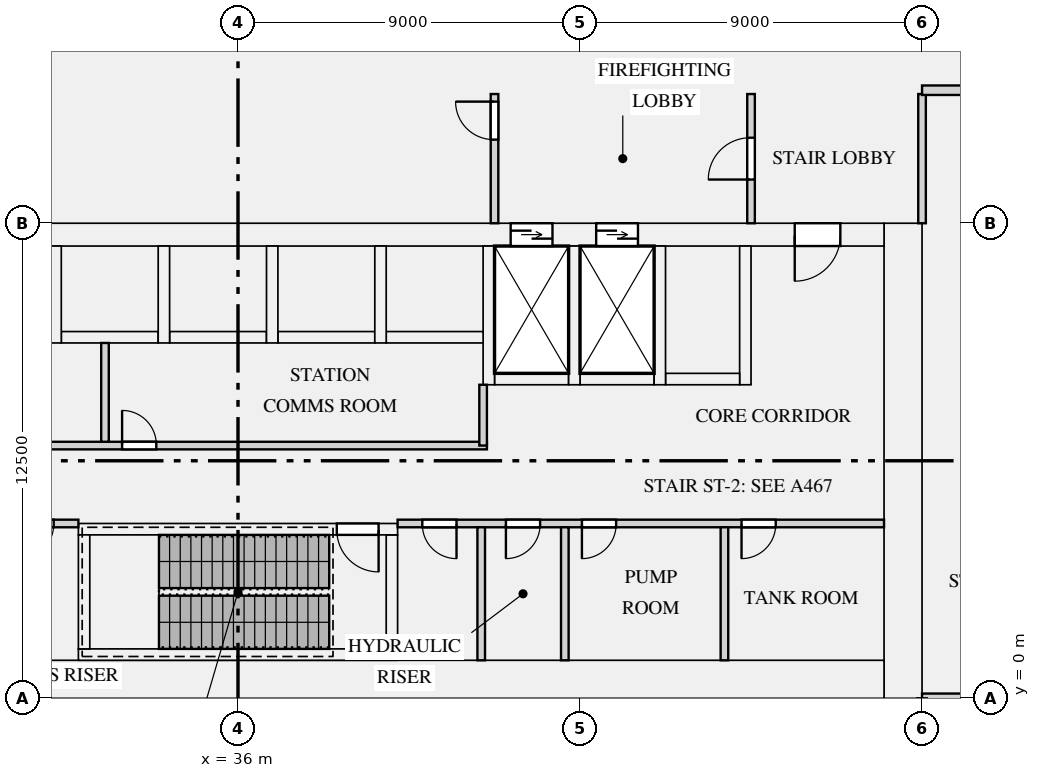
"""IFC4 building model, lengths in metres.
Left out: names, types, materials, properties, quantities, classifications, styles, units other than length and angle.
Written with IfcOpenShell. Run it as: python <this file> out.ifc"""

import sys

from ifc_helpers import new_model, si_unit, direction, frame, frame_2d, origin, place, context, subcontext, project, spatial, rectangle, extrude, element, fill, save


model = new_model("IFC4")
c1 = context("Model", 3, precision=1e-05, world=origin(), true_north=direction((0.0, 1.0)))
c2 = subcontext(c1, "Body", "Model", "MODEL_VIEW")
j1 = project(units=[si_unit("LENGTHUNIT", "METRE"), si_unit("PLANEANGLEUNIT", "RADIAN")], contexts=[c1])
p1 = place(None, origin())
s1 = spatial("IfcSite", under=j1, at=p1, CompositionType="ELEMENT")
p2 = place(p1, origin())
s2 = spatial("IfcBuilding", under=s1, at=p2, CompositionType="ELEMENT")
p3 = place(p2, frame((0.0, 0.0, -6.0)))
s3 = spatial("IfcBuildingStorey", under=s2, at=p3, CompositionType="ELEMENT", Elevation=-6.0)
p4 = place(p3, frame((53.5, 0.0, -0.5), z_axis=(0.0, 0.0, 1.0), x_axis=(0.0, 1.0, 0.0)))
e1 = element("IfcWall", 1, at=p4, inside=s3, PredefinedType="SHEAR", context=c2, shape_type="SweptSolid", body=[
    extrude(rectangle(XDim=12.5, YDim=1.0, at=frame_2d((6.25, 0.0))), origin(), (0.0, 0.0, 1.0), 6.5),
])
p5 = place(p3, frame((19.0, 0.5, -0.5), z_axis=(0.0, 0.0, 1.0), x_axis=(1.0, 0.0, 0.0)))
e2 = element("IfcWall", 2, at=p5, inside=s3, PredefinedType="SHEAR", context=c2, shape_type="SweptSolid", body=[
    extrude(rectangle(XDim=34.0, YDim=1.0, at=frame_2d((17.0, 0.0))), origin(), (0.0, 0.0, 1.0), 6.5),
])
p6 = place(p3, frame((19.0, 12.2, -0.5), z_axis=(0.0, 0.0, 1.0), x_axis=(1.0, 0.0, 0.0)))
e3 = element("IfcWall", 3, at=p6, inside=s3, PredefinedType="SHEAR", context=c2, shape_type="SweptSolid", body=[
    extrude(rectangle(XDim=34.0, YDim=0.6, at=frame_2d((17.0, 0.0))), origin(), (0.0, 0.0, 1.0), 6.5),
])
p7 = place(p6, frame((24.175, 0.0, 0.5)))
e4 = element("IfcOpeningElement", 4, at=p7, cuts=e3, PredefinedType="OPENING", context=c2, shape_type="SweptSolid", body=[
    extrude(rectangle(XDim=1.1, YDim=2.1, at=frame_2d((0.55, 1.05))), frame((0.0, 0.31, 0.0), z_axis=(0.0, -1.0, 0.0), x_axis=(1.0, 0.0, 0.0)), (0.0, 0.0, 1.0), 0.62),
])
p8 = place(p6, frame((26.425, 0.0, 0.5)))
e5 = element("IfcOpeningElement", 5, at=p8, cuts=e3, PredefinedType="OPENING", context=c2, shape_type="SweptSolid", body=[
    extrude(rectangle(XDim=1.1, YDim=2.1, at=frame_2d((0.55, 1.05))), frame((0.0, 0.31, 0.0), z_axis=(0.0, -1.0, 0.0), x_axis=(1.0, 0.0, 0.0)), (0.0, 0.0, 1.0), 0.62),
])
p9 = place(p6, frame((1.15, 0.0, 0.5)))
e6 = element("IfcOpeningElement", 6, at=p9, cuts=e3, PredefinedType="OPENING", context=c2, shape_type="SweptSolid", body=[
    extrude(rectangle(XDim=1.2, YDim=2.1, at=frame_2d((0.6, 1.05))), frame((0.0, 0.31, 0.0), z_axis=(0.0, -1.0, 0.0), x_axis=(1.0, 0.0, 0.0)), (0.0, 0.0, 1.0), 0.62),
])
p10 = place(p6, frame((31.65, 0.0, 0.5)))
e7 = element("IfcOpeningElement", 7, at=p10, cuts=e3, PredefinedType="OPENING", context=c2, shape_type="SweptSolid", body=[
    extrude(rectangle(XDim=1.2, YDim=2.1, at=frame_2d((0.6, 1.05))), frame((0.0, 0.31, 0.0), z_axis=(0.0, -1.0, 0.0), x_axis=(1.0, 0.0, 0.0)), (0.0, 0.0, 1.0), 0.62),
])
for number, where, z_axis, x_axis in (
    (8, (31.35, 9.5, -0.5), (0.0, 0.0, 1.0), (1.0, 0.0, 0.0)),
    (9, (31.2, 9.35, -0.5), (0.0, 0.0, 1.0), (0.0, 1.0, 0.0)),
):
    element("IfcWall", number, at=place(p3, frame(where, z_axis=z_axis, x_axis=x_axis)), inside=s3, PredefinedType="SHEAR", context=c2, shape_type="SweptSolid", body=[
        extrude(rectangle(XDim=2.55, YDim=0.3, at=frame_2d((1.275, 0.0))), origin(), (0.0, 0.0, 1.0), 6.5),
    ])
p11 = place(p3, frame((34.2, 9.5, -0.5), z_axis=(0.0, 0.0, 1.0), x_axis=(1.0, 0.0, 0.0)))
e10 = element("IfcWall", 10, at=p11, inside=s3, PredefinedType="SHEAR", context=c2, shape_type="SweptSolid", body=[
    extrude(rectangle(XDim=2.55, YDim=0.3, at=frame_2d((1.275, 0.0))), origin(), (0.0, 0.0, 1.0), 6.5),
])
p12 = place(p3, frame((34.05, 9.35, -0.5), z_axis=(0.0, 0.0, 1.0), x_axis=(0.0, 1.0, 0.0)))
e11 = element("IfcWall", 11, at=p12, inside=s3, PredefinedType="SHEAR", context=c2, shape_type="SweptSolid", body=[
    extrude(rectangle(XDim=2.55, YDim=0.3, at=frame_2d((1.275, 0.0))), origin(), (0.0, 0.0, 1.0), 6.5),
])
p13 = place(p3, frame((37.05, 9.5, -0.5), z_axis=(0.0, 0.0, 1.0), x_axis=(1.0, 0.0, 0.0)))
e12 = element("IfcWall", 12, at=p13, inside=s3, PredefinedType="SHEAR", context=c2, shape_type="SweptSolid", body=[
    extrude(rectangle(XDim=2.55, YDim=0.3, at=frame_2d((1.275, 0.0))), origin(), (0.0, 0.0, 1.0), 6.5),
])
p14 = place(p3, frame((36.9, 9.35, -0.5), z_axis=(0.0, 0.0, 1.0), x_axis=(0.0, 1.0, 0.0)))
e13 = element("IfcWall", 13, at=p14, inside=s3, PredefinedType="SHEAR", context=c2, shape_type="SweptSolid", body=[
    extrude(rectangle(XDim=2.55, YDim=0.3, at=frame_2d((1.275, 0.0))), origin(), (0.0, 0.0, 1.0), 6.5),
])
p15 = place(p3, frame((39.9, 9.5, -0.5), z_axis=(0.0, 0.0, 1.0), x_axis=(1.0, 0.0, 0.0)))
e14 = element("IfcWall", 14, at=p15, inside=s3, PredefinedType="SHEAR", context=c2, shape_type="SweptSolid", body=[
    extrude(rectangle(XDim=2.55, YDim=0.3, at=frame_2d((1.275, 0.0))), origin(), (0.0, 0.0, 1.0), 6.5),
])
p16 = place(p3, frame((39.75, 9.35, -0.5), z_axis=(0.0, 0.0, 1.0), x_axis=(0.0, 1.0, 0.0)))
e15 = element("IfcWall", 15, at=p16, inside=s3, PredefinedType="SHEAR", context=c2, shape_type="SweptSolid", body=[
    extrude(rectangle(XDim=2.55, YDim=0.3, at=frame_2d((1.275, 0.0))), origin(), (0.0, 0.0, 1.0), 6.5),
])
p17 = place(p3, frame((42.75, 8.4, -0.5), z_axis=(0.0, 0.0, 1.0), x_axis=(1.0, 0.0, 0.0)))
e16 = element("IfcWall", 16, at=p17, inside=s3, PredefinedType="SHEAR", context=c2, shape_type="SweptSolid", body=[
    extrude(rectangle(XDim=1.95, YDim=0.3, at=frame_2d((0.975, 0.0))), origin(), (0.0, 0.0, 1.0), 6.5),
])
p18 = place(p3, frame((42.6, 8.25, -0.5), z_axis=(0.0, 0.0, 1.0), x_axis=(0.0, 1.0, 0.0)))
e17 = element("IfcWall", 17, at=p18, inside=s3, PredefinedType="SHEAR", context=c2, shape_type="SweptSolid", body=[
    extrude(rectangle(XDim=3.65, YDim=0.3, at=frame_2d((1.825, 0.0))), origin(), (0.0, 0.0, 1.0), 6.5),
])
p19 = place(p3, frame((45.0, 8.4, -0.5), z_axis=(0.0, 0.0, 1.0), x_axis=(1.0, 0.0, 0.0)))
e18 = element("IfcWall", 18, at=p19, inside=s3, PredefinedType="SHEAR", context=c2, shape_type="SweptSolid", body=[
    extrude(rectangle(XDim=1.95, YDim=0.3, at=frame_2d((0.975, 0.0))), origin(), (0.0, 0.0, 1.0), 6.5),
])
p20 = place(p3, frame((44.85, 8.25, -0.5), z_axis=(0.0, 0.0, 1.0), x_axis=(0.0, 1.0, 0.0)))
e19 = element("IfcWall", 19, at=p20, inside=s3, PredefinedType="SHEAR", context=c2, shape_type="SweptSolid", body=[
    extrude(rectangle(XDim=3.65, YDim=0.3, at=frame_2d((1.825, 0.0))), origin(), (0.0, 0.0, 1.0), 6.5),
])
p21 = place(p3, frame((47.25, 8.4, -0.5), z_axis=(0.0, 0.0, 1.0), x_axis=(1.0, 0.0, 0.0)))
e20 = element("IfcWall", 20, at=p21, inside=s3, PredefinedType="SHEAR", context=c2, shape_type="SweptSolid", body=[
    extrude(rectangle(XDim=1.95, YDim=0.3, at=frame_2d((0.975, 0.0))), origin(), (0.0, 0.0, 1.0), 6.5),
])
for number, where, z_axis, x_axis in (
    (21, (47.1, 8.25, -0.5), (0.0, 0.0, 1.0), (0.0, 1.0, 0.0)),
    (22, (49.35, 8.25, -0.5), (0.0, 0.0, 1.0), (0.0, 1.0, 0.0)),
):
    element("IfcWall", number, at=place(p3, frame(where, z_axis=z_axis, x_axis=x_axis)), inside=s3, PredefinedType="SHEAR", context=c2, shape_type="SweptSolid", body=[
        extrude(rectangle(XDim=3.65, YDim=0.3, at=frame_2d((1.825, 0.0))), origin(), (0.0, 0.0, 1.0), 6.5),
    ])
p22 = place(p3, frame((31.8, 1.15, -0.5), z_axis=(0.0, 0.0, 1.0), x_axis=(1.0, 0.0, 0.0)))
e23 = element("IfcWall", 23, at=p22, inside=s3, PredefinedType="SHEAR", context=c2, shape_type="SweptSolid", body=[
    extrude(rectangle(XDim=8.4, YDim=0.3, at=frame_2d((4.2, 0.0))), origin(), (0.0, 0.0, 1.0), 6.5),
])
p23 = place(p3, frame((31.8, 4.45, -0.5), z_axis=(0.0, 0.0, 1.0), x_axis=(1.0, 0.0, 0.0)))
e24 = element("IfcWall", 24, at=p23, inside=s3, PredefinedType="SHEAR", context=c2, shape_type="SweptSolid", body=[
    extrude(rectangle(XDim=8.4, YDim=0.3, at=frame_2d((4.2, 0.0))), origin(), (0.0, 0.0, 1.0), 6.5),
])
p24 = place(p23, frame((6.8, 0.0, 0.5)))
e25 = element("IfcOpeningElement", 25, at=p24, cuts=e24, PredefinedType="OPENING", context=c2, shape_type="SweptSolid", body=[
    extrude(rectangle(XDim=1.1, YDim=2.1, at=frame_2d((0.55, 1.05))), frame((0.0, 0.16, 0.0), z_axis=(0.0, -1.0, 0.0), x_axis=(1.0, 0.0, 0.0)), (0.0, 0.0, 1.0), 0.32),
])
for number, where, z_axis, x_axis in (
    (26, (31.95, 1.3, -0.5), (0.0, 0.0, 1.0), (0.0, 1.0, 0.0)),
    (27, (40.05, 1.3, -0.5), (0.0, 0.0, 1.0), (0.0, 1.0, 0.0)),
):
    element("IfcWall", number, at=place(p3, frame(where, z_axis=z_axis, x_axis=x_axis)), inside=s3, PredefinedType="SHEAR", context=c2, shape_type="SweptSolid", body=[
        extrude(rectangle(XDim=3.0, YDim=0.3, at=frame_2d((1.5, 0.0))), origin(), (0.0, 0.0, 1.0), 6.5),
    ])
p25 = place(p3, frame((19.0, 4.6, 0.0), z_axis=(0.0, 0.0, 1.0), x_axis=(1.0, 0.0, 0.0)))
e28 = element("IfcWall", 28, at=p25, inside=s3, PredefinedType="PARTITIONING", context=c2, shape_type="SweptSolid", body=[
    extrude(rectangle(XDim=12.8, YDim=0.2, at=frame_2d((6.4, 0.0))), origin(), (0.0, 0.0, 1.0), 5.598),
])
p26 = place(p25, frame((0.45, 0.0, 0.0)))
e29 = element("IfcOpeningElement", 29, at=p26, cuts=e28, PredefinedType="OPENING", context=c2, shape_type="SweptSolid", body=[
    extrude(rectangle(XDim=0.9, YDim=2.1, at=frame_2d((0.45, 1.05))), frame((0.0, 0.11, 0.0), z_axis=(0.0, -1.0, 0.0), x_axis=(1.0, 0.0, 0.0)), (0.0, 0.0, 1.0), 0.22),
])
p27 = place(p25, frame((9.05, 0.0, 0.0)))
e30 = element("IfcOpeningElement", 30, at=p27, cuts=e28, PredefinedType="OPENING", context=c2, shape_type="SweptSolid", body=[
    extrude(rectangle(XDim=0.9, YDim=2.1, at=frame_2d((0.45, 1.05))), frame((0.0, 0.11, 0.0), z_axis=(0.0, -1.0, 0.0), x_axis=(1.0, 0.0, 0.0)), (0.0, 0.0, 1.0), 0.22),
])
p28 = place(p25, frame((11.25, 0.0, 0.0)))
e31 = element("IfcOpeningElement", 31, at=p28, cuts=e28, PredefinedType="OPENING", context=c2, shape_type="SweptSolid", body=[
    extrude(rectangle(XDim=0.9, YDim=2.1, at=frame_2d((0.45, 1.05))), frame((0.0, 0.11, 0.0), z_axis=(0.0, -1.0, 0.0), x_axis=(1.0, 0.0, 0.0)), (0.0, 0.0, 1.0), 0.22),
])
p29 = place(p3, frame((40.2, 4.6, 0.0), z_axis=(0.0, 0.0, 1.0), x_axis=(1.0, 0.0, 0.0)))
e32 = element("IfcWall", 32, at=p29, inside=s3, PredefinedType="PARTITIONING", context=c2, shape_type="SweptSolid", body=[
    extrude(rectangle(XDim=12.8, YDim=0.2, at=frame_2d((6.4, 0.0))), origin(), (0.0, 0.0, 1.0), 5.598),
])
p30 = place(p29, frame((4.85, 0.0, 0.0)))
e33 = element("IfcOpeningElement", 33, at=p30, cuts=e32, PredefinedType="OPENING", context=c2, shape_type="SweptSolid", body=[
    extrude(rectangle(XDim=0.9, YDim=2.1, at=frame_2d((0.45, 1.05))), frame((0.0, 0.11, 0.0), z_axis=(0.0, -1.0, 0.0), x_axis=(1.0, 0.0, 0.0)), (0.0, 0.0, 1.0), 0.22),
])
p31 = place(p29, frame((9.05, 0.0, 0.0)))
e34 = element("IfcOpeningElement", 34, at=p31, cuts=e32, PredefinedType="OPENING", context=c2, shape_type="SweptSolid", body=[
    extrude(rectangle(XDim=0.9, YDim=2.1, at=frame_2d((0.45, 1.05))), frame((0.0, 0.11, 0.0), z_axis=(0.0, -1.0, 0.0), x_axis=(1.0, 0.0, 0.0)), (0.0, 0.0, 1.0), 0.22),
])
p32 = place(p29, frame((0.65, 0.0, 0.0)))
e35 = element("IfcOpeningElement", 35, at=p32, cuts=e32, PredefinedType="OPENING", context=c2, shape_type="SweptSolid", body=[
    extrude(rectangle(XDim=0.9, YDim=2.1, at=frame_2d((0.45, 1.05))), frame((0.0, 0.11, 0.0), z_axis=(0.0, -1.0, 0.0), x_axis=(1.0, 0.0, 0.0)), (0.0, 0.0, 1.0), 0.22),
])
p33 = place(p29, frame((2.85, 0.0, 0.0)))
e36 = element("IfcOpeningElement", 36, at=p33, cuts=e32, PredefinedType="OPENING", context=c2, shape_type="SweptSolid", body=[
    extrude(rectangle(XDim=0.9, YDim=2.1, at=frame_2d((0.45, 1.05))), frame((0.0, 0.11, 0.0), z_axis=(0.0, -1.0, 0.0), x_axis=(1.0, 0.0, 0.0)), (0.0, 0.0, 1.0), 0.22),
])
p34 = place(p3, frame((22.1, 6.65, 0.0), z_axis=(0.0, 0.0, 1.0), x_axis=(1.0, 0.0, 0.0)))
e37 = element("IfcWall", 37, at=p34, inside=s3, PredefinedType="PARTITIONING", context=c2, shape_type="SweptSolid", body=[
    extrude(rectangle(XDim=20.45, YDim=0.2, at=frame_2d((10.225, 0.0))), origin(), (0.0, 0.0, 1.0), 5.598),
])
p35 = place(p34, frame((0.55, 0.0, 0.0)))
e38 = element("IfcOpeningElement", 38, at=p35, cuts=e37, PredefinedType="OPENING", context=c2, shape_type="SweptSolid", body=[
    extrude(rectangle(XDim=0.9, YDim=2.1, at=frame_2d((0.45, 1.05))), frame((0.0, 0.11, 0.0), z_axis=(0.0, -1.0, 0.0), x_axis=(1.0, 0.0, 0.0)), (0.0, 0.0, 1.0), 0.22),
])
p36 = place(p34, frame((10.85, 0.0, 0.0)))
e39 = element("IfcOpeningElement", 39, at=p36, cuts=e37, PredefinedType="OPENING", context=c2, shape_type="SweptSolid", body=[
    extrude(rectangle(XDim=0.9, YDim=2.1, at=frame_2d((0.45, 1.05))), frame((0.0, 0.11, 0.0), z_axis=(0.0, -1.0, 0.0), x_axis=(1.0, 0.0, 0.0)), (0.0, 0.0, 1.0), 0.22),
])
for number, where, z_axis, x_axis in (
    (40, (42.4, 1.0, 0.0), (0.0, 0.0, 1.0), (0.0, 1.0, 0.0)),
    (41, (44.6, 1.0, 0.0), (0.0, 0.0, 1.0), (0.0, 1.0, 0.0)),
    (42, (48.8, 1.0, 0.0), (0.0, 0.0, 1.0), (0.0, 1.0, 0.0)),
):
    element("IfcWall", number, at=place(p3, frame(where, z_axis=z_axis, x_axis=x_axis)), inside=s3, PredefinedType="PARTITIONING", context=c2, shape_type="SweptSolid", body=[
        extrude(rectangle(XDim=3.5, YDim=0.2, at=frame_2d((1.75, 0.0))), origin(), (0.0, 0.0, 1.0), 5.598),
    ])
p37 = place(p3, frame((42.45, 6.65, 0.0), z_axis=(0.0, 0.0, 1.0), x_axis=(0.0, 1.0, 0.0)))
e43 = element("IfcWall", 43, at=p37, inside=s3, PredefinedType="PARTITIONING", context=c2, shape_type="SweptSolid", body=[
    extrude(rectangle(XDim=1.6, YDim=0.2, at=frame_2d((0.8, 0.0))), origin(), (0.0, 0.0, 1.0), 5.598),
])
p38 = place(p3, frame((32.5, 6.75, 0.0), z_axis=(0.0, 0.0, 1.0), x_axis=(0.0, 1.0, 0.0)))
e44 = element("IfcWall", 44, at=p38, inside=s3, PredefinedType="PARTITIONING", context=c2, shape_type="SweptSolid", body=[
    extrude(rectangle(XDim=2.6, YDim=0.2, at=frame_2d((1.3, 0.0))), origin(), (0.0, 0.0, 1.0), 5.598),
])
p39 = place(p3, frame((42.75, 12.5, 0.0), z_axis=(0.0, 0.0, 1.0), x_axis=(0.0, 1.0, 0.0)))
e45 = element("IfcWall", 45, at=p39, inside=s3, PredefinedType="PARTITIONING", context=c2, shape_type="SweptSolid", body=[
    extrude(rectangle(XDim=3.4, YDim=0.2, at=frame_2d((1.7, 0.0))), origin(), (0.0, 0.0, 1.0), 5.598),
])
p40 = place(p39, frame((2.2, 0.0, 0.0)))
e46 = element("IfcOpeningElement", 46, at=p40, cuts=e45, PredefinedType="OPENING", context=c2, shape_type="SweptSolid", body=[
    extrude(rectangle(XDim=1.0, YDim=2.1, at=frame_2d((0.5, 1.05))), frame((0.0, 0.11, 0.0), z_axis=(0.0, -1.0, 0.0), x_axis=(1.0, 0.0, 0.0)), (0.0, 0.0, 1.0), 0.22),
])
p41 = place(p3, frame((49.5, 12.5, 0.0), z_axis=(0.0, 0.0, 1.0), x_axis=(0.0, 1.0, 0.0)))
e47 = element("IfcWall", 47, at=p41, inside=s3, PredefinedType="PARTITIONING", context=c2, shape_type="SweptSolid", body=[
    extrude(rectangle(XDim=3.4, YDim=0.2, at=frame_2d((1.7, 0.0))), origin(), (0.0, 0.0, 1.0), 5.598),
])
p42 = place(p41, frame((1.15, 0.0, 0.0)))
e48 = element("IfcOpeningElement", 48, at=p42, cuts=e47, PredefinedType="OPENING", context=c2, shape_type="SweptSolid", body=[
    extrude(rectangle(XDim=1.1, YDim=2.1, at=frame_2d((0.55, 1.05))), frame((0.0, 0.11, 0.0), z_axis=(0.0, -1.0, 0.0), x_axis=(1.0, 0.0, 0.0)), (0.0, 0.0, 1.0), 0.22),
])
p43 = place(p3, frame((54.0, 12.5, 0.0), z_axis=(0.0, 0.0, 1.0), x_axis=(0.0, 1.0, 0.0)))
e49 = element("IfcWall", 49, at=p43, inside=s3, PredefinedType="PARTITIONING", context=c2, shape_type="SweptSolid", body=[
    extrude(rectangle(XDim=3.4, YDim=0.2, at=frame_2d((1.7, 0.0))), origin(), (0.0, 0.0, 1.0), 5.598),
])
p44 = place(p3, frame((54.0, 16.0, 0.0), z_axis=(0.0, 0.0, 1.0), x_axis=(1.0, 0.0, 0.0)))
e50 = element("IfcWall", 50, at=p44, inside=s3, PredefinedType="PARTITIONING", context=c2, shape_type="SweptSolid", body=[
    extrude(rectangle(XDim=18.0, YDim=0.25, at=frame_2d((9.0, 0.0))), origin(), (0.0, 0.0, 1.0), 5.598),
])
p45 = place(p44, frame((8.5, 0.0, 0.0)))
e51 = element("IfcOpeningElement", 51, at=p45, cuts=e50, PredefinedType="OPENING", context=c2, shape_type="SweptSolid", body=[
    extrude(rectangle(XDim=1.0, YDim=2.1, at=frame_2d((0.5, 1.05))), frame((0.0, 0.135, 0.0), z_axis=(0.0, -1.0, 0.0), x_axis=(1.0, 0.0, 0.0)), (0.0, 0.0, 1.0), 0.27),
])
p46 = place(p3, frame((54.0, 0.0, 0.0), z_axis=(0.0, 0.0, 1.0), x_axis=(1.0, 0.0, 0.0)))
e52 = element("IfcWall", 52, at=p46, inside=s3, PredefinedType="PARTITIONING", context=c2, shape_type="SweptSolid", body=[
    extrude(rectangle(XDim=18.0, YDim=0.25, at=frame_2d((9.0, 0.0))), origin(), (0.0, 0.0, 1.0), 5.598),
])
p47 = place(p7, origin())
e53 = element("IfcDoor", 53, at=p47, inside=s3, OperationType="DOUBLE_DOOR_SLIDING", PredefinedType="DOOR", context=c2, shape_type="SweptSolid", body=[
    extrude(rectangle(XDim=1.1, YDim=2.1, at=frame_2d((0.55, 1.05))), frame((0.0, 0.025, 0.0), z_axis=(0.0, -1.0, 0.0), x_axis=(1.0, 0.0, 0.0)), (0.0, 0.0, 1.0), 0.05),
])
fill(e4, e53)
p48 = place(p8, origin())
e54 = element("IfcDoor", 54, at=p48, inside=s3, OperationType="DOUBLE_DOOR_SLIDING", PredefinedType="DOOR", context=c2, shape_type="SweptSolid", body=[
    extrude(rectangle(XDim=1.1, YDim=2.1, at=frame_2d((0.55, 1.05))), frame((0.0, 0.025, 0.0), z_axis=(0.0, -1.0, 0.0), x_axis=(1.0, 0.0, 0.0)), (0.0, 0.0, 1.0), 0.05),
])
fill(e5, e54)
p49 = place(p24, frame((1.1, 0.0, 0.0), z_axis=(0.0, 0.0, 1.0), x_axis=(-1.0, 0.0, 0.0)))
e55 = element("IfcDoor", 55, at=p49, inside=s3, OperationType="SINGLE_SWING_LEFT", PredefinedType="DOOR", context=c2, shape_type="SweptSolid", body=[
    extrude(rectangle(XDim=1.1, YDim=2.1, at=frame_2d((0.55, 1.05))), frame((0.0, 0.025, 0.0), z_axis=(0.0, -1.0, 0.0), x_axis=(1.0, 0.0, 0.0)), (0.0, 0.0, 1.0), 0.05),
])
fill(e25, e55)
p50 = place(p36, origin())
e56 = element("IfcDoor", 56, at=p50, inside=s3, OperationType="SINGLE_SWING_LEFT", PredefinedType="DOOR", context=c2, shape_type="SweptSolid", body=[
    extrude(rectangle(XDim=0.9, YDim=2.1, at=frame_2d((0.45, 1.05))), frame((0.0, 0.025, 0.0), z_axis=(0.0, -1.0, 0.0), x_axis=(1.0, 0.0, 0.0)), (0.0, 0.0, 1.0), 0.05),
])
fill(e39, e56)
p51 = place(p30, frame((0.9, 0.0, 0.0), z_axis=(0.0, 0.0, 1.0), x_axis=(-1.0, 0.0, 0.0)))
e57 = element("IfcDoor", 57, at=p51, inside=s3, OperationType="SINGLE_SWING_RIGHT", PredefinedType="DOOR", context=c2, shape_type="SweptSolid", body=[
    extrude(rectangle(XDim=0.9, YDim=2.1, at=frame_2d((0.45, 1.05))), frame((0.0, 0.025, 0.0), z_axis=(0.0, -1.0, 0.0), x_axis=(1.0, 0.0, 0.0)), (0.0, 0.0, 1.0), 0.05),
])
fill(e33, e57)
p52 = place(p31, frame((0.9, 0.0, 0.0), z_axis=(0.0, 0.0, 1.0), x_axis=(-1.0, 0.0, 0.0)))
e58 = element("IfcDoor", 58, at=p52, inside=s3, OperationType="SINGLE_SWING_RIGHT", PredefinedType="DOOR", context=c2, shape_type="SweptSolid", body=[
    extrude(rectangle(XDim=0.9, YDim=2.1, at=frame_2d((0.45, 1.05))), frame((0.0, 0.025, 0.0), z_axis=(0.0, -1.0, 0.0), x_axis=(1.0, 0.0, 0.0)), (0.0, 0.0, 1.0), 0.05),
])
fill(e34, e58)
p53 = place(p28, frame((0.9, 0.0, 0.0), z_axis=(0.0, 0.0, 1.0), x_axis=(-1.0, 0.0, 0.0)))
e59 = element("IfcDoor", 59, at=p53, inside=s3, OperationType="SINGLE_SWING_RIGHT", PredefinedType="DOOR", context=c2, shape_type="SweptSolid", body=[
    extrude(rectangle(XDim=0.9, YDim=2.1, at=frame_2d((0.45, 1.05))), frame((0.0, 0.025, 0.0), z_axis=(0.0, -1.0, 0.0), x_axis=(1.0, 0.0, 0.0)), (0.0, 0.0, 1.0), 0.05),
])
fill(e31, e59)
p54 = place(p32, frame((0.9, 0.0, 0.0), z_axis=(0.0, 0.0, 1.0), x_axis=(-1.0, 0.0, 0.0)))
e60 = element("IfcDoor", 60, at=p54, inside=s3, OperationType="SINGLE_SWING_LEFT", PredefinedType="DOOR", context=c2, shape_type="SweptSolid", body=[
    extrude(rectangle(XDim=0.9, YDim=2.1, at=frame_2d((0.45, 1.05))), frame((0.0, 0.025, 0.0), z_axis=(0.0, -1.0, 0.0), x_axis=(1.0, 0.0, 0.0)), (0.0, 0.0, 1.0), 0.05),
])
fill(e35, e60)
p55 = place(p33, frame((0.9, 0.0, 0.0), z_axis=(0.0, 0.0, 1.0), x_axis=(-1.0, 0.0, 0.0)))
e61 = element("IfcDoor", 61, at=p55, inside=s3, OperationType="SINGLE_SWING_RIGHT", PredefinedType="DOOR", context=c2, shape_type="SweptSolid", body=[
    extrude(rectangle(XDim=0.9, YDim=2.1, at=frame_2d((0.45, 1.05))), frame((0.0, 0.025, 0.0), z_axis=(0.0, -1.0, 0.0), x_axis=(1.0, 0.0, 0.0)), (0.0, 0.0, 1.0), 0.05),
])
fill(e36, e61)
p56 = place(p10, frame((1.2, 0.0, 0.0), z_axis=(0.0, 0.0, 1.0), x_axis=(-1.0, 0.0, 0.0)))
e62 = element("IfcDoor", 62, at=p56, inside=s3, OperationType="SINGLE_SWING_RIGHT", PredefinedType="DOOR", context=c2, shape_type="SweptSolid", body=[
    extrude(rectangle(XDim=1.2, YDim=2.1, at=frame_2d((0.6, 1.05))), frame((0.0, 0.025, 0.0), z_axis=(0.0, -1.0, 0.0), x_axis=(1.0, 0.0, 0.0)), (0.0, 0.0, 1.0), 0.05),
])
fill(e7, e62)
p57 = place(p40, origin())
e63 = element("IfcDoor", 63, at=p57, inside=s3, OperationType="SINGLE_SWING_RIGHT", PredefinedType="DOOR", context=c2, shape_type="SweptSolid", body=[
    extrude(rectangle(XDim=1.0, YDim=2.1, at=frame_2d((0.5, 1.05))), frame((0.0, 0.025, 0.0), z_axis=(0.0, -1.0, 0.0), x_axis=(1.0, 0.0, 0.0)), (0.0, 0.0, 1.0), 0.05),
])
fill(e46, e63)
p58 = place(p42, origin())
e64 = element("IfcDoor", 64, at=p58, inside=s3, OperationType="SINGLE_SWING_LEFT", PredefinedType="DOOR", context=c2, shape_type="SweptSolid", body=[
    extrude(rectangle(XDim=1.1, YDim=2.1, at=frame_2d((0.55, 1.05))), frame((0.0, 0.025, 0.0), z_axis=(0.0, -1.0, 0.0), x_axis=(1.0, 0.0, 0.0)), (0.0, 0.0, 1.0), 0.05),
])
fill(e48, e64)
save(model, sys.argv[1])
